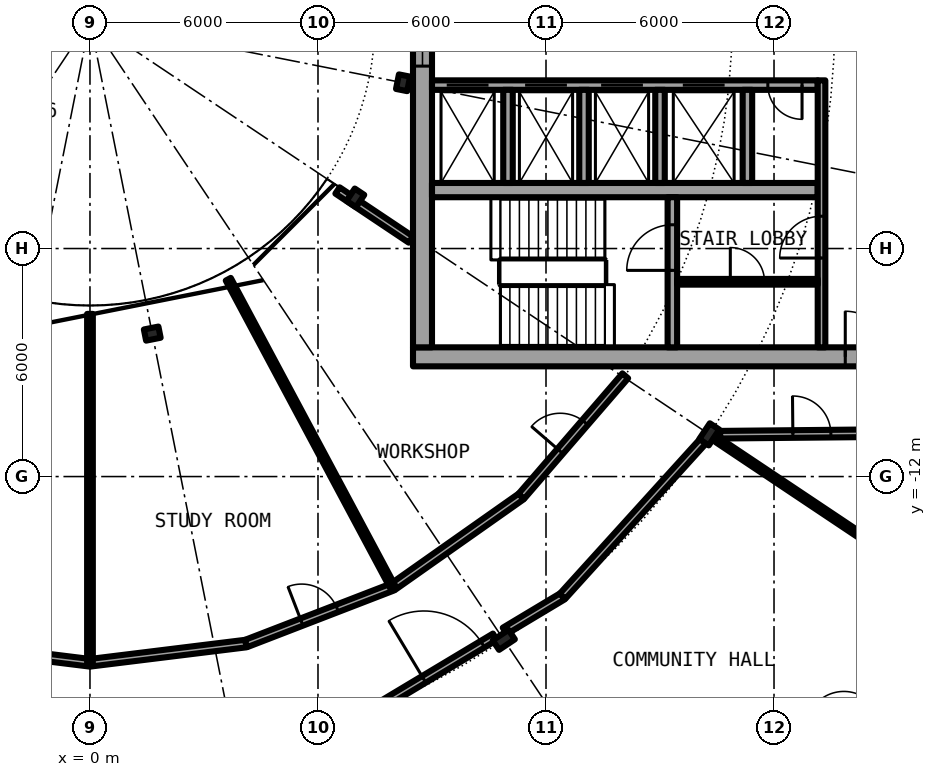
"""IFC4 building model, lengths in metres.
Left out: names, types, materials, properties, quantities, classifications, styles, units other than length and angle.
Written with IfcOpenShell. Run it as: python <this file> out.ifc"""

import sys

from ifc_helpers import new_model, si_unit, direction, frame, frame_2d, origin, origin_2d, place, context, subcontext, project, spatial, rectangle, i_section, extrude, element, fill, save


model = new_model("IFC4")
c1 = context("Model", 3, precision=1e-05, world=origin(), true_north=direction((0.0, 1.0)))
c2 = subcontext(c1, "Body", "Model", "MODEL_VIEW")
j1 = project(units=[si_unit("LENGTHUNIT", "METRE"), si_unit("PLANEANGLEUNIT", "RADIAN")], contexts=[c1])
p1 = place(None, origin())
s1 = spatial("IfcSite", under=j1, at=p1, CompositionType="ELEMENT")
p2 = place(p1, origin())
s2 = spatial("IfcBuilding", under=s1, at=p2, CompositionType="ELEMENT")
p3 = place(p2, frame((0.0, 0.0, 157.4)))
s3 = spatial("IfcBuildingStorey", under=s2, at=p3, CompositionType="ELEMENT", Elevation=157.4)
for number, where, z_axis, x_axis in (
    (1, (10.889, -16.297, 0.0), (0.0, 0.0, 1.0), (0.556, -0.831, 0.0)),
    (2, (16.297, -10.889, 0.0), (0.0, 0.0, 1.0), (0.831, -0.556, 0.0)),
):
    element("IfcColumn", number, at=place(p3, frame(where, z_axis=z_axis, x_axis=x_axis)), inside=s3, PredefinedType="COLUMN", context=c2, shape_type="SweptSolid", body=[
        extrude(i_section(OverallWidth=0.3, OverallDepth=0.5, WebThickness=0.014, FlangeThickness=0.028, FilletRadius=0.027, at=origin_2d()), origin(), (0.0, 0.0, 1.0), 4.2),
    ])
for number, where, z_axis, x_axis in (
    (3, (1.639, -8.239, 0.0), (0.0, 0.0, 1.0), (0.195, -0.981, 0.0)),
    (4, (6.984, -4.667, 0.0), (0.0, 0.0, 1.0), (0.831, -0.556, 0.0)),
    (5, (8.239, -1.639, 0.0), (0.0, 0.0, 1.0), (0.981, -0.195, 0.0)),
):
    element("IfcColumn", number, at=place(p3, frame(where, z_axis=z_axis, x_axis=x_axis)), inside=s3, PredefinedType="COLUMN", context=c2, shape_type="SweptSolid", body=[
        extrude(i_section(OverallWidth=0.3, OverallDepth=0.39, WebThickness=0.011, FlangeThickness=0.019, FilletRadius=0.027, at=origin_2d()), origin(), (0.0, 0.0, 1.0), 4.2),
    ])
p4 = place(p3, frame((19.304, -19.304, 0.0), z_axis=(0.0, 0.0, 1.0), x_axis=(0.634382322723, 0.773019449054, 0.0)))
e6 = element("IfcWall", 6, at=p4, inside=s3, PredefinedType="SOLIDWALL", context=c2, shape_type="SweptSolid", body=[
    extrude(rectangle(XDim=5.352, YDim=0.25, at=frame_2d((2.676, 0.0))), origin(), (0.0, 0.0, 1.0), 3.85),
])
p5 = place(p4, frame((0.841, 0.0, 0.0)))
e7 = element("IfcOpeningElement", 7, at=p5, cuts=e6, PredefinedType="OPENING", context=c2, shape_type="SweptSolid", body=[
    extrude(rectangle(XDim=1.0, YDim=2.2, at=frame_2d((0.5, 1.1))), frame((0.0, 0.135, 0.0), z_axis=(0.0, -1.0, 0.0), x_axis=(1.0, 0.0, 0.0)), (0.0, 0.0, 1.0), 0.27),
])
p6 = place(p4, frame((3.51, 0.0, 0.0)))
e8 = element("IfcOpeningElement", 8, at=p6, cuts=e6, PredefinedType="OPENING", context=c2, shape_type="SweptSolid", body=[
    extrude(rectangle(XDim=1.0, YDim=2.2, at=frame_2d((0.5, 1.1))), frame((0.0, 0.135, 0.0), z_axis=(0.0, -1.0, 0.0), x_axis=(1.0, 0.0, 0.0)), (0.0, 0.0, 1.0), 0.27),
])
p7 = place(p3, frame((8.5, -8.85, 0.0), z_axis=(0.0, 0.0, 1.0), x_axis=(1.0, 0.0, 0.0)))
e9 = element("IfcWall", 9, at=p7, inside=s3, PredefinedType="SHEAR", context=c2, shape_type="SweptSolid", body=[
    extrude(rectangle(XDim=13.6, YDim=0.5, at=frame_2d((6.8, 0.0))), origin(), (0.0, 0.0, 1.0), 4.2),
])
p8 = place(p7, frame((11.375, 0.0, 0.0)))
e10 = element("IfcOpeningElement", 10, at=p8, cuts=e9, PredefinedType="OPENING", context=c2, shape_type="SweptSolid", body=[
    extrude(rectangle(XDim=1.2, YDim=2.3, at=frame_2d((0.6, 1.15))), frame((0.0, 0.26, 0.0), z_axis=(0.0, -1.0, 0.0), x_axis=(1.0, 0.0, 0.0)), (0.0, 0.0, 1.0), 0.52),
])
p9 = place(p3, frame((8.75, -8.6, 0.0), z_axis=(0.0, 0.0, 1.0), x_axis=(0.0, 1.0, 0.0)))
e11 = element("IfcWall", 11, at=p9, inside=s3, PredefinedType="SHEAR", context=c2, shape_type="SweptSolid", body=[
    extrude(rectangle(XDim=17.2, YDim=0.5, at=frame_2d((8.6, 0.0))), origin(), (0.0, 0.0, 1.0), 4.2),
])
p10 = place(p9, frame((7.4, 0.0, 0.1)))
e12 = element("IfcOpeningElement", 12, at=p10, cuts=e11, PredefinedType="OPENING", context=c2, shape_type="SweptSolid", body=[
    extrude(rectangle(XDim=2.4, YDim=2.2, at=frame_2d((1.2, 1.1))), frame((0.0, 0.26, 0.0), z_axis=(0.0, -1.0, 0.0), x_axis=(1.0, 0.0, 0.0)), (0.0, 0.0, 1.0), 0.52),
])
p11 = place(p3, frame((19.15, -1.7, 0.0), z_axis=(0.0, 0.0, 1.0), x_axis=(-1.0, 0.0, 0.0)))
e13 = element("IfcWall", 13, at=p11, inside=s3, PredefinedType="SHEAR", context=c2, shape_type="SweptSolid", body=[
    extrude(rectangle(XDim=10.15, YDim=0.25, at=frame_2d((5.075, 0.0))), origin(), (0.0, 0.0, 1.0), 4.2),
])
p12 = place(p11, frame((8.663, 0.0, 0.0)))
e14 = element("IfcOpeningElement", 14, at=p12, cuts=e13, PredefinedType="OPENING", context=c2, shape_type="SweptSolid", body=[
    extrude(rectangle(XDim=1.1, YDim=2.3, at=frame_2d((0.55, 1.15))), frame((0.0, 0.135, 0.0), z_axis=(0.0, -1.0, 0.0), x_axis=(1.0, 0.0, 0.0)), (0.0, 0.0, 1.0), 0.27),
])
p13 = place(p11, frame((6.6, 0.0, 0.0)))
e15 = element("IfcOpeningElement", 15, at=p13, cuts=e13, PredefinedType="OPENING", context=c2, shape_type="SweptSolid", body=[
    extrude(rectangle(XDim=1.1, YDim=2.3, at=frame_2d((0.55, 1.15))), frame((0.0, 0.135, 0.0), z_axis=(0.0, -1.0, 0.0), x_axis=(1.0, 0.0, 0.0)), (0.0, 0.0, 1.0), 0.27),
])
p14 = place(p11, frame((4.6, 0.0, 0.0)))
e16 = element("IfcOpeningElement", 16, at=p14, cuts=e13, PredefinedType="OPENING", context=c2, shape_type="SweptSolid", body=[
    extrude(rectangle(XDim=1.1, YDim=2.3, at=frame_2d((0.55, 1.15))), frame((0.0, 0.135, 0.0), z_axis=(0.0, -1.0, 0.0), x_axis=(1.0, 0.0, 0.0)), (0.0, 0.0, 1.0), 0.27),
])
p15 = place(p11, frame((2.45, 0.0, 0.0)))
e17 = element("IfcOpeningElement", 17, at=p15, cuts=e13, PredefinedType="OPENING", context=c2, shape_type="SweptSolid", body=[
    extrude(rectangle(XDim=1.1, YDim=2.3, at=frame_2d((0.55, 1.15))), frame((0.0, 0.135, 0.0), z_axis=(0.0, -1.0, 0.0), x_axis=(1.0, 0.0, 0.0)), (0.0, 0.0, 1.0), 0.27),
])
p16 = place(p11, frame((0.413, 0.0, 0.0)))
e18 = element("IfcOpeningElement", 18, at=p16, cuts=e13, PredefinedType="OPENING", context=c2, shape_type="SweptSolid", body=[
    extrude(rectangle(XDim=0.9, YDim=2.3, at=frame_2d((0.45, 1.15))), frame((0.0, 0.135, 0.0), z_axis=(0.0, -1.0, 0.0), x_axis=(1.0, 0.0, 0.0)), (0.0, 0.0, 1.0), 0.27),
])
p17 = place(p3, frame((9.0, -4.462, 0.0), z_axis=(0.0, 0.0, 1.0), x_axis=(1.0, 0.0, 0.0)))
e19 = element("IfcWall", 19, at=p17, inside=s3, PredefinedType="SHEAR", context=c2, shape_type="SweptSolid", body=[
    extrude(rectangle(XDim=10.15, YDim=0.375, at=frame_2d((5.075, 0.0))), origin(), (0.0, 0.0, 1.0), 4.2),
])
p18 = place(p3, frame((15.325, -8.6, 0.0), z_axis=(0.0, 0.0, 1.0), x_axis=(0.0, 1.0, 0.0)))
e20 = element("IfcWall", 20, at=p18, inside=s3, PredefinedType="SHEAR", context=c2, shape_type="SweptSolid", body=[
    extrude(rectangle(XDim=3.95, YDim=0.25, at=frame_2d((1.975, 0.0))), origin(), (0.0, 0.0, 1.0), 4.2),
])
p19 = place(p18, frame((2.025, 0.0, 0.0)))
e21 = element("IfcOpeningElement", 21, at=p19, cuts=e20, PredefinedType="OPENING", context=c2, shape_type="SweptSolid", body=[
    extrude(rectangle(XDim=1.2, YDim=2.3, at=frame_2d((0.6, 1.15))), frame((0.0, 0.135, 0.0), z_axis=(0.0, -1.0, 0.0), x_axis=(1.0, 0.0, 0.0)), (0.0, 0.0, 1.0), 0.27),
])
for number, where, z_axis, x_axis in (
    (22, (15.0, -1.825, 0.0), (0.0, 0.0, 1.0), (0.0, -1.0, 0.0)),
    (23, (17.3, -1.825, 0.0), (0.0, 0.0, 1.0), (0.0, -1.0, 0.0)),
):
    element("IfcWall", number, at=place(p3, frame(where, z_axis=z_axis, x_axis=x_axis)), inside=s3, PredefinedType="SOLIDWALL", context=c2, shape_type="SweptSolid", body=[
        extrude(rectangle(XDim=2.45, YDim=0.25, at=frame_2d((1.225, 0.0))), origin(), (0.0, 0.0, 1.0), 3.85),
    ])
p20 = place(p3, frame((19.25, -8.6, 0.0), z_axis=(0.0, 0.0, 1.0), x_axis=(0.0, 1.0, 0.0)))
e24 = element("IfcWall", 24, at=p20, inside=s3, PredefinedType="SOLIDWALL", context=c2, shape_type="SweptSolid", body=[
    extrude(rectangle(XDim=7.025, YDim=0.2, at=frame_2d((3.513, 0.0))), origin(), (0.0, 0.0, 1.0), 3.85),
])
p21 = place(p20, frame((2.35, 0.0, 0.0)))
e25 = element("IfcOpeningElement", 25, at=p21, cuts=e24, PredefinedType="OPENING", context=c2, shape_type="SweptSolid", body=[
    extrude(rectangle(XDim=1.1, YDim=2.3, at=frame_2d((0.55, 1.15))), frame((0.0, 0.11, 0.0), z_axis=(0.0, -1.0, 0.0), x_axis=(1.0, 0.0, 0.0)), (0.0, 0.0, 1.0), 0.22),
])
for number, where, z_axis, x_axis in (
    (26, (11.0, -1.825, 0.0), (0.0, 0.0, 1.0), (0.0, -1.0, 0.0)),
    (27, (13.0, -1.825, 0.0), (0.0, 0.0, 1.0), (0.0, -1.0, 0.0)),
):
    element("IfcWall", number, at=place(p3, frame(where, z_axis=z_axis, x_axis=x_axis)), inside=s3, PredefinedType="SOLIDWALL", context=c2, shape_type="SweptSolid", body=[
        extrude(rectangle(XDim=2.45, YDim=0.25, at=frame_2d((1.225, 0.0))), origin(), (0.0, 0.0, 1.0), 3.85),
    ])
p22 = place(p3, frame((15.45, -6.875, 0.0), z_axis=(0.0, 0.0, 1.0), x_axis=(1.0, 0.0, 0.0)))
e28 = element("IfcWall", 28, at=p22, inside=s3, PredefinedType="PARTITIONING", context=c2, shape_type="SweptSolid", body=[
    extrude(rectangle(XDim=3.7, YDim=0.15, at=frame_2d((1.85, 0.0))), origin(), (0.0, 0.0, 1.0), 3.85),
])
p23 = place(p22, frame((1.4, 0.0, 0.0)))
e29 = element("IfcOpeningElement", 29, at=p23, cuts=e28, PredefinedType="OPENING", context=c2, shape_type="SweptSolid", body=[
    extrude(rectangle(XDim=0.9, YDim=2.3, at=frame_2d((0.45, 1.15))), frame((0.0, 0.085, 0.0), z_axis=(0.0, -1.0, 0.0), x_axis=(1.0, 0.0, 0.0)), (0.0, 0.0, 1.0), 0.17),
])
p24 = place(p3, frame((7.501, -18.108, 0.0), z_axis=(0.0, 0.0, 1.0), x_axis=(0.857750505244, 0.514066212421, 0.0)))
e30 = element("IfcWall", 30, at=p24, inside=s3, PredefinedType="PARTITIONING", context=c2, shape_type="SweptSolid", body=[
    extrude(rectangle(XDim=3.678, YDim=0.2, at=frame_2d((1.839, 0.0))), origin(), (0.0, 0.0, 1.0), 3.54),
])
p25 = place(p24, frame((1.5, 0.0, 0.0)))
e31 = element("IfcOpeningElement", 31, at=p25, cuts=e30, PredefinedType="OPENING", context=c2, shape_type="SweptSolid", body=[
    extrude(rectangle(XDim=1.8, YDim=2.3, at=frame_2d((0.9, 1.15))), frame((0.0, 0.11, 0.0), z_axis=(0.0, -1.0, 0.0), x_axis=(1.0, 0.0, 0.0)), (0.0, 0.0, 1.0), 0.22),
])
p26 = place(p3, frame((10.913, -16.063, 0.0), z_axis=(0.0, 0.0, 1.0), x_axis=(0.857614365469, 0.514293301668, 0.0)))
e32 = element("IfcWall", 32, at=p26, inside=s3, PredefinedType="PARTITIONING", context=c2, shape_type="SweptSolid", body=[
    extrude(rectangle(XDim=1.773, YDim=0.2, at=frame_2d((0.887, 0.0))), origin(), (0.0, 0.0, 1.0), 3.54),
])
p27 = place(p3, frame((12.434, -15.151, 0.0), z_axis=(0.0, 0.0, 1.0), x_axis=(0.671532887857, 0.740974750262, 0.0)))
e33 = element("IfcWall", 33, at=p27, inside=s3, PredefinedType="PARTITIONING", context=c2, shape_type="SweptSolid", body=[
    extrude(rectangle(XDim=5.601, YDim=0.2, at=frame_2d((2.8, 0.0))), origin(), (0.0, 0.0, 1.0), 3.54),
])
for number, where, z_axis, x_axis in (
    (34, (-4.106, -16.394, 0.0), (0.0, 0.0, 1.0), (0.992, -0.122, 0.0)),
    (35, (0.0, -16.9, 0.0), (0.0, 0.0, 1.0), (0.992, 0.122, 0.0)),
):
    element("IfcWall", number, at=place(p3, frame(where, z_axis=z_axis, x_axis=x_axis)), inside=s3, PredefinedType="PARTITIONING", context=c2, shape_type="SweptSolid", body=[
        extrude(rectangle(XDim=4.137, YDim=0.2, at=frame_2d((2.068, 0.0))), origin(), (0.0, 0.0, 1.0), 3.85),
    ])
p28 = place(p3, frame((4.106, -16.394, 0.0), z_axis=(0.0, 0.0, 1.0), x_axis=(0.932943640288, 0.360022449363, 0.0)))
e36 = element("IfcWall", 36, at=p28, inside=s3, PredefinedType="PARTITIONING", context=c2, shape_type="SweptSolid", body=[
    extrude(rectangle(XDim=4.139, YDim=0.2, at=frame_2d((2.069, 0.0))), origin(), (0.0, 0.0, 1.0), 3.85),
])
p29 = place(p28, frame((1.569, 0.0, 0.0)))
e37 = element("IfcOpeningElement", 37, at=p29, cuts=e36, PredefinedType="OPENING", context=c2, shape_type="SweptSolid", body=[
    extrude(rectangle(XDim=1.0, YDim=2.3, at=frame_2d((0.5, 1.15))), frame((0.0, 0.11, 0.0), z_axis=(0.0, -1.0, 0.0), x_axis=(1.0, 0.0, 0.0)), (0.0, 0.0, 1.0), 0.22),
])
p30 = place(p3, frame((7.967, -14.904, 0.0), z_axis=(0.0, 0.0, 1.0), x_axis=(0.817567680547, 0.575832517079, 0.0)))
e38 = element("IfcWall", 38, at=p30, inside=s3, PredefinedType="PARTITIONING", context=c2, shape_type="SweptSolid", body=[
    extrude(rectangle(XDim=4.137, YDim=0.2, at=frame_2d((2.068, 0.0))), origin(), (0.0, 0.0, 1.0), 3.85),
])
p31 = place(p3, frame((11.349, -12.522, 0.0), z_axis=(0.0, 0.0, 1.0), x_axis=(0.653273870261, 0.757121687996, 0.0)))
e39 = element("IfcWall", 39, at=p31, inside=s3, PredefinedType="PARTITIONING", context=c2, shape_type="SweptSolid", body=[
    extrude(rectangle(XDim=4.189, YDim=0.2, at=frame_2d((2.095, 0.0))), origin(), (0.0, 0.0, 1.0), 3.85),
])
p32 = place(p31, frame((1.569, 0.0, 0.0)))
e40 = element("IfcOpeningElement", 40, at=p32, cuts=e39, PredefinedType="OPENING", context=c2, shape_type="SweptSolid", body=[
    extrude(rectangle(XDim=1.0, YDim=2.3, at=frame_2d((0.5, 1.15))), frame((0.0, 0.11, 0.0), z_axis=(0.0, -1.0, 0.0), x_axis=(1.0, 0.0, 0.0)), (0.0, 0.0, 1.0), 0.22),
])
p33 = place(p3, frame((16.582, -10.899, 0.0), z_axis=(0.0, 0.0, 1.0), x_axis=(0.999954045313, 0.009586827528, 0.0)))
e41 = element("IfcWall", 41, at=p33, inside=s3, PredefinedType="PARTITIONING", context=c2, shape_type="SweptSolid", body=[
    extrude(rectangle(XDim=5.093, YDim=0.2, at=frame_2d((2.547, 0.0))), origin(), (0.0, 0.0, 1.0), 3.85),
])
p34 = place(p33, frame((1.914, 0.0, 0.0)))
e42 = element("IfcOpeningElement", 42, at=p34, cuts=e41, PredefinedType="OPENING", context=c2, shape_type="SweptSolid", body=[
    extrude(rectangle(XDim=1.0, YDim=2.3, at=frame_2d((0.5, 1.15))), frame((0.0, 0.11, 0.0), z_axis=(0.0, -1.0, 0.0), x_axis=(1.0, 0.0, 0.0)), (0.0, 0.0, 1.0), 0.22),
])
p35 = place(p3, frame((6.513, -4.472, 0.0), z_axis=(0.0, 0.0, 1.0), x_axis=(0.83133816625, -0.555766905579, 0.0)))
e43 = element("IfcWall", 43, at=p35, inside=s3, PredefinedType="PARTITIONING", context=c2, shape_type="SweptSolid", body=[
    extrude(rectangle(XDim=2.323, YDim=0.2, at=frame_2d((1.162, 0.0))), origin(), (0.0, 0.0, 1.0), 3.85),
])
p36 = place(p3, frame((0.0, -16.9, 0.0), z_axis=(0.0, 0.0, 1.0), x_axis=(0.0, 1.0, 0.0)))
e44 = element("IfcWall", 44, at=p36, inside=s3, PredefinedType="PARTITIONING", context=c2, shape_type="SweptSolid", body=[
    extrude(rectangle(XDim=9.18, YDim=0.15, at=frame_2d((4.59, 0.0))), origin(), (0.0, 0.0, 1.0), 3.85),
])
p37 = place(p3, frame((3.639, -6.808, 0.0), z_axis=(0.0, 0.0, 1.0), x_axis=(0.471460365694, -0.881887251059, 0.0)))
e45 = element("IfcWall", 45, at=p37, inside=s3, PredefinedType="PARTITIONING", context=c2, shape_type="SweptSolid", body=[
    extrude(rectangle(XDim=9.18, YDim=0.15, at=frame_2d((4.59, 0.0))), origin(), (0.0, 0.0, 1.0), 3.85),
])
p38 = place(p3, frame((16.503, -11.031, 0.0), z_axis=(0.0, 0.0, 1.0), x_axis=(0.831419048668, -0.555645899393, 0.0)))
e46 = element("IfcWall", 46, at=p38, inside=s3, PredefinedType="PARTITIONING", context=c2, shape_type="SweptSolid", body=[
    extrude(rectangle(XDim=7.325, YDim=0.15, at=frame_2d((3.663, 0.0))), origin(), (0.0, 0.0, 1.0), 3.85),
])
p39 = place(p12, origin())
e47 = element("IfcDoor", 47, at=p39, inside=s3, OperationType="DOUBLE_DOOR_SLIDING", PredefinedType="DOOR", context=c2, shape_type="SweptSolid", body=[
    extrude(rectangle(XDim=1.1, YDim=2.3, at=frame_2d((0.55, 1.15))), frame((0.0, 0.025, 0.0), z_axis=(0.0, -1.0, 0.0), x_axis=(1.0, 0.0, 0.0)), (0.0, 0.0, 1.0), 0.05),
])
fill(e14, e47)
p40 = place(p13, origin())
e48 = element("IfcDoor", 48, at=p40, inside=s3, OperationType="DOUBLE_DOOR_SLIDING", PredefinedType="DOOR", context=c2, shape_type="SweptSolid", body=[
    extrude(rectangle(XDim=1.1, YDim=2.3, at=frame_2d((0.55, 1.15))), frame((0.0, 0.025, 0.0), z_axis=(0.0, -1.0, 0.0), x_axis=(1.0, 0.0, 0.0)), (0.0, 0.0, 1.0), 0.05),
])
fill(e15, e48)
p41 = place(p14, origin())
e49 = element("IfcDoor", 49, at=p41, inside=s3, OperationType="DOUBLE_DOOR_SLIDING", PredefinedType="DOOR", context=c2, shape_type="SweptSolid", body=[
    extrude(rectangle(XDim=1.1, YDim=2.3, at=frame_2d((0.55, 1.15))), frame((0.0, 0.025, 0.0), z_axis=(0.0, -1.0, 0.0), x_axis=(1.0, 0.0, 0.0)), (0.0, 0.0, 1.0), 0.05),
])
fill(e16, e49)
p42 = place(p15, origin())
e50 = element("IfcDoor", 50, at=p42, inside=s3, OperationType="DOUBLE_DOOR_SLIDING", PredefinedType="DOOR", context=c2, shape_type="SweptSolid", body=[
    extrude(rectangle(XDim=1.1, YDim=2.3, at=frame_2d((0.55, 1.15))), frame((0.0, 0.025, 0.0), z_axis=(0.0, -1.0, 0.0), x_axis=(1.0, 0.0, 0.0)), (0.0, 0.0, 1.0), 0.05),
])
fill(e17, e50)
p43 = place(p16, origin())
e51 = element("IfcDoor", 51, at=p43, inside=s3, OperationType="SINGLE_SWING_RIGHT", PredefinedType="DOOR", context=c2, shape_type="SweptSolid", body=[
    extrude(rectangle(XDim=0.9, YDim=2.3, at=frame_2d((0.45, 1.15))), frame((0.0, 0.025, 0.0), z_axis=(0.0, -1.0, 0.0), x_axis=(1.0, 0.0, 0.0)), (0.0, 0.0, 1.0), 0.05),
])
fill(e18, e51)
p44 = place(p23, origin())
e52 = element("IfcDoor", 52, at=p44, inside=s3, OperationType="SINGLE_SWING_LEFT", PredefinedType="DOOR", context=c2, shape_type="SweptSolid", body=[
    extrude(rectangle(XDim=0.9, YDim=2.3, at=frame_2d((0.45, 1.15))), frame((0.0, 0.025, 0.0), z_axis=(0.0, -1.0, 0.0), x_axis=(1.0, 0.0, 0.0)), (0.0, 0.0, 1.0), 0.05),
])
fill(e29, e52)
p45 = place(p19, origin())
e53 = element("IfcDoor", 53, at=p45, inside=s3, OperationType="SINGLE_SWING_LEFT", PredefinedType="DOOR", context=c2, shape_type="SweptSolid", body=[
    extrude(rectangle(XDim=1.2, YDim=2.3, at=frame_2d((0.6, 1.15))), frame((0.0, 0.025, 0.0), z_axis=(0.0, -1.0, 0.0), x_axis=(1.0, 0.0, 0.0)), (0.0, 0.0, 1.0), 0.05),
])
fill(e21, e53)
p46 = place(p21, origin())
e54 = element("IfcDoor", 54, at=p46, inside=s3, OperationType="SINGLE_SWING_RIGHT", PredefinedType="DOOR", context=c2, shape_type="SweptSolid", body=[
    extrude(rectangle(XDim=1.1, YDim=2.3, at=frame_2d((0.55, 1.15))), frame((0.0, 0.025, 0.0), z_axis=(0.0, -1.0, 0.0), x_axis=(1.0, 0.0, 0.0)), (0.0, 0.0, 1.0), 0.05),
])
fill(e25, e54)
p47 = place(p8, origin())
e55 = element("IfcDoor", 55, at=p47, inside=s3, OperationType="SINGLE_SWING_LEFT", PredefinedType="DOOR", context=c2, shape_type="SweptSolid", body=[
    extrude(rectangle(XDim=1.2, YDim=2.3, at=frame_2d((0.6, 1.15))), frame((0.0, 0.025, 0.0), z_axis=(0.0, -1.0, 0.0), x_axis=(1.0, 0.0, 0.0)), (0.0, 0.0, 1.0), 0.05),
])
fill(e10, e55)
p48 = place(p10, origin())
e56 = element("IfcWindow", 56, at=p48, inside=s3, PartitioningType="SINGLE_PANEL", PredefinedType="WINDOW", context=c2, shape_type="SweptSolid", body=[
    extrude(rectangle(XDim=2.4, YDim=2.2, at=frame_2d((1.2, 1.1))), frame((0.0, 0.03, 0.0), z_axis=(0.0, -1.0, 0.0), x_axis=(1.0, 0.0, 0.0)), (0.0, 0.0, 1.0), 0.06),
])
fill(e12, e56)
p49 = place(p25, origin())
e57 = element("IfcDoor", 57, at=p49, inside=s3, OperationType="DOUBLE_DOOR_SINGLE_SWING", PredefinedType="DOOR", context=c2, shape_type="SweptSolid", body=[
    extrude(rectangle(XDim=1.8, YDim=2.3, at=frame_2d((0.9, 1.15))), frame((0.0, 0.025, 0.0), z_axis=(0.0, -1.0, 0.0), x_axis=(1.0, 0.0, 0.0)), (0.0, 0.0, 1.0), 0.05),
])
fill(e31, e57)
p50 = place(p29, origin())
e58 = element("IfcDoor", 58, at=p50, inside=s3, OperationType="SINGLE_SWING_RIGHT", PredefinedType="DOOR", context=c2, shape_type="SweptSolid", body=[
    extrude(rectangle(XDim=1.0, YDim=2.3, at=frame_2d((0.5, 1.15))), frame((0.0, 0.025, 0.0), z_axis=(0.0, -1.0, 0.0), x_axis=(1.0, 0.0, 0.0)), (0.0, 0.0, 1.0), 0.05),
])
fill(e37, e58)
p51 = place(p32, origin())
e59 = element("IfcDoor", 59, at=p51, inside=s3, OperationType="SINGLE_SWING_RIGHT", PredefinedType="DOOR", context=c2, shape_type="SweptSolid", body=[
    extrude(rectangle(XDim=1.0, YDim=2.3, at=frame_2d((0.5, 1.15))), frame((0.0, 0.025, 0.0), z_axis=(0.0, -1.0, 0.0), x_axis=(1.0, 0.0, 0.0)), (0.0, 0.0, 1.0), 0.05),
])
fill(e40, e59)
p52 = place(p34, origin())
e60 = element("IfcDoor", 60, at=p52, inside=s3, OperationType="SINGLE_SWING_LEFT", PredefinedType="DOOR", context=c2, shape_type="SweptSolid", body=[
    extrude(rectangle(XDim=1.0, YDim=2.3, at=frame_2d((0.5, 1.15))), frame((0.0, 0.025, 0.0), z_axis=(0.0, -1.0, 0.0), x_axis=(1.0, 0.0, 0.0)), (0.0, 0.0, 1.0), 0.05),
])
fill(e42, e60)
save(model, sys.argv[1])
